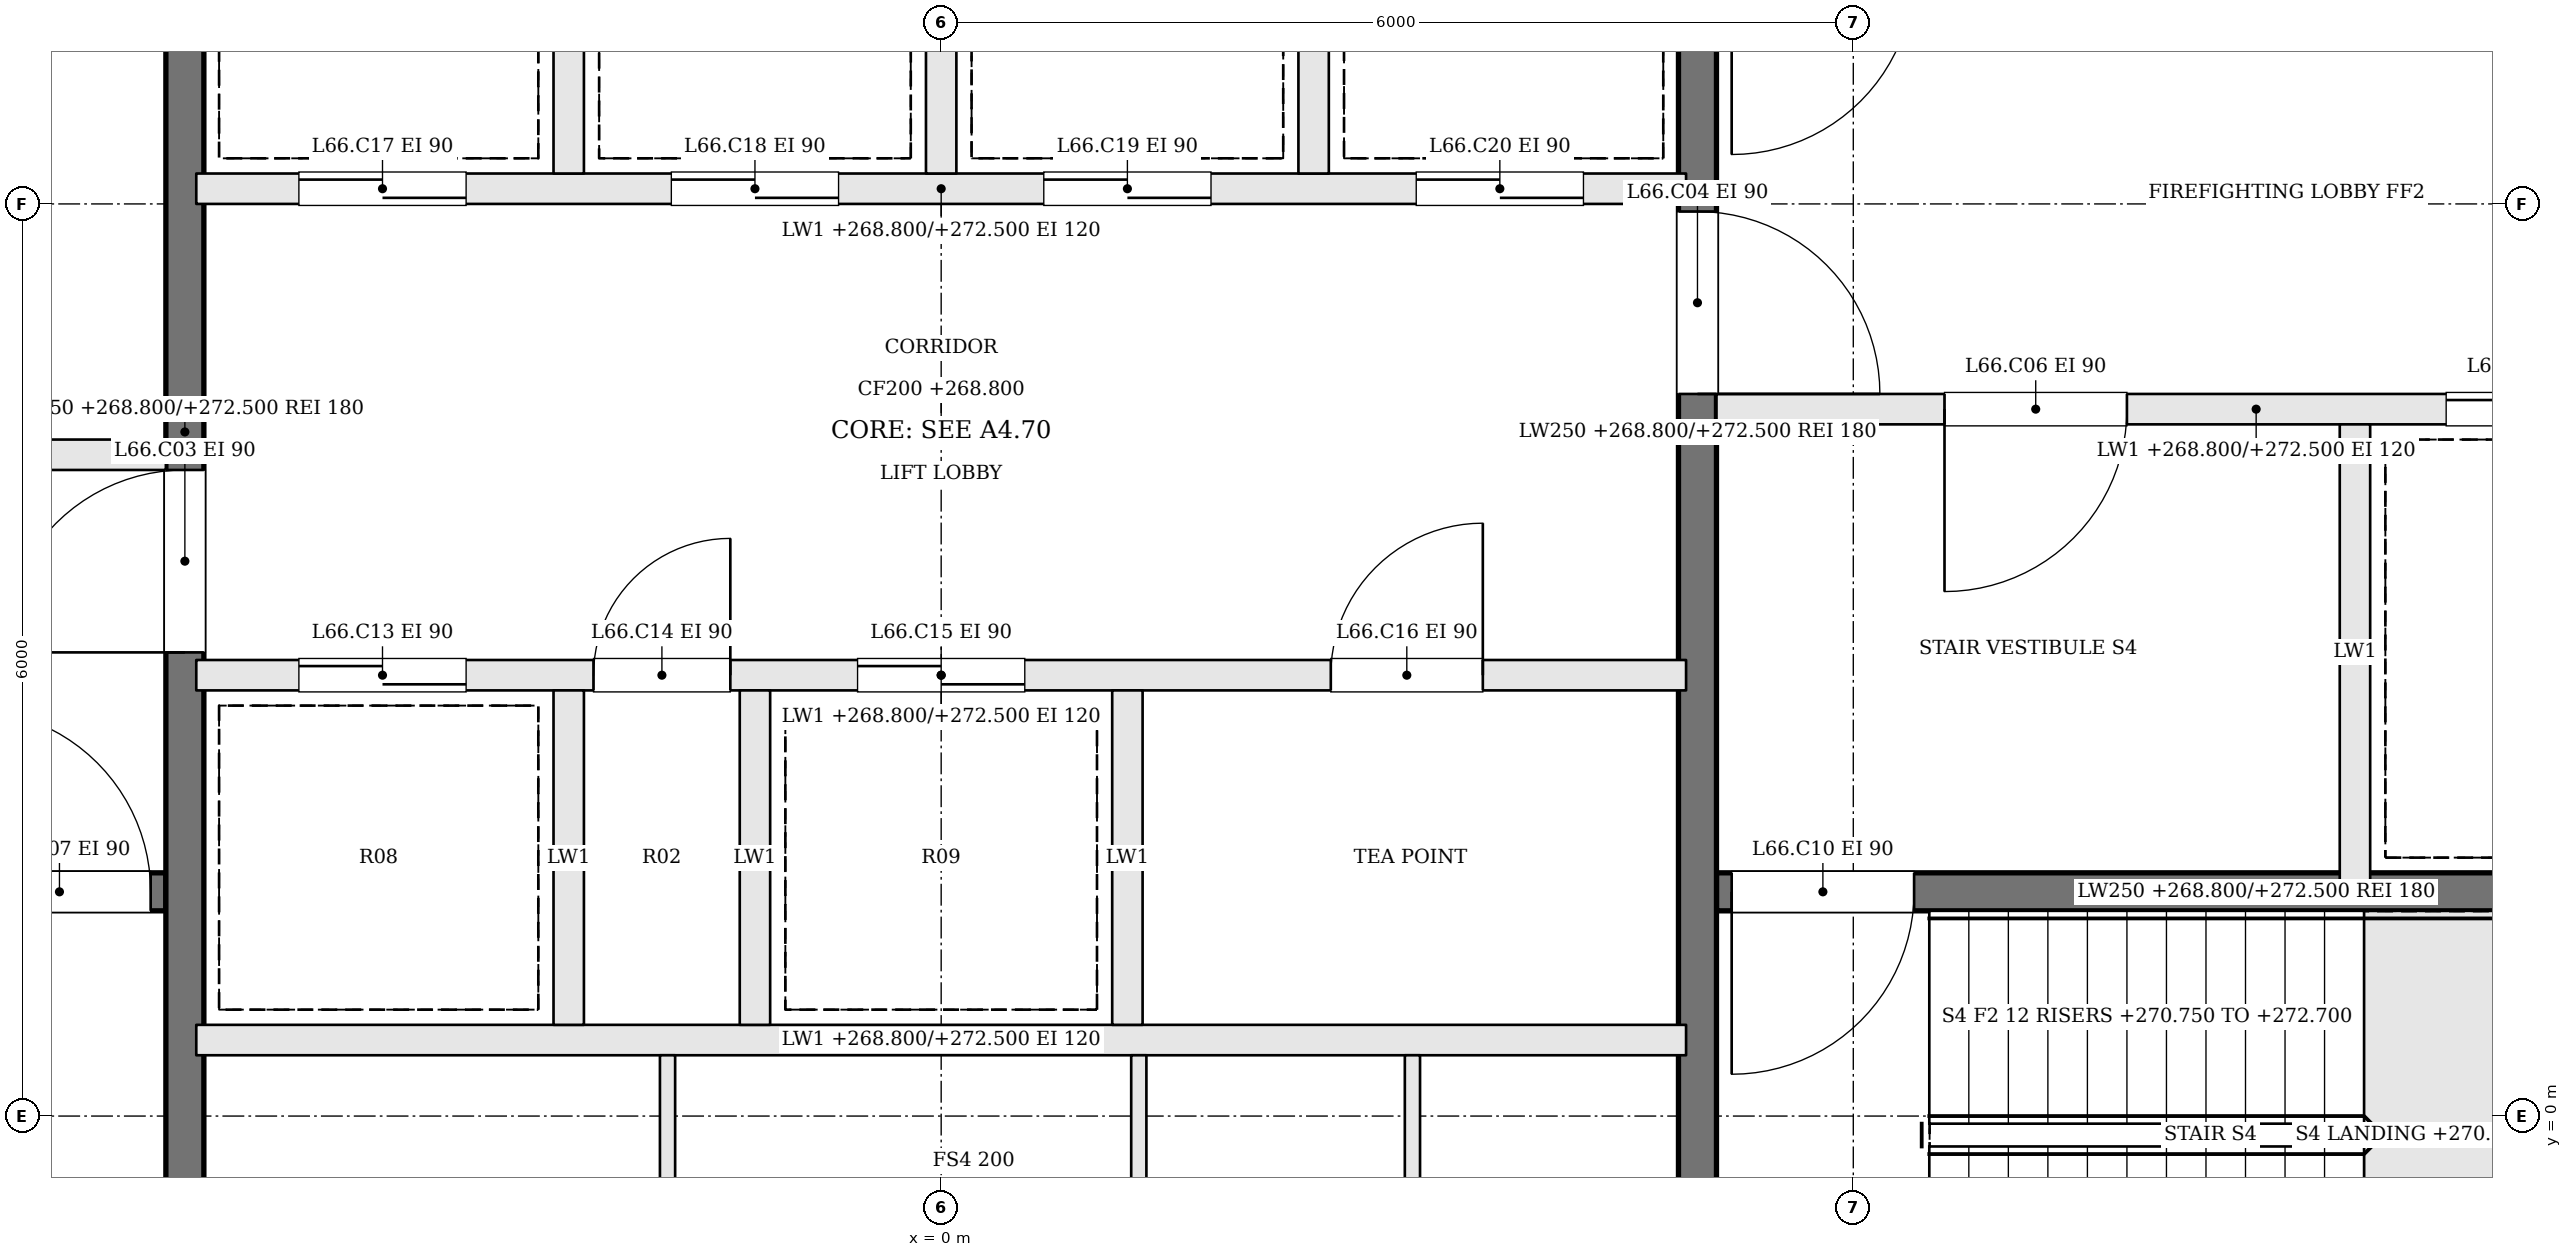
"""IFC4 building model, lengths in metres.
Left out: names, types, materials, properties, quantities, classifications, styles, units other than length and angle.
Written with IfcOpenShell. Run it as: python <this file> out.ifc"""

import sys

from ifc_helpers import new_model, si_unit, direction, frame, frame_2d, origin, place, context, subcontext, project, spatial, rectangle, extrude, element, fill, save


model = new_model("IFC4")
c1 = context("Model", 3, precision=1e-05, world=origin(), true_north=direction((0.0, 1.0)))
c2 = subcontext(c1, "Body", "Model", "MODEL_VIEW")
j1 = project(units=[si_unit("LENGTHUNIT", "METRE"), si_unit("PLANEANGLEUNIT", "RADIAN")], contexts=[c1])
p1 = place(None, origin())
s1 = spatial("IfcSite", under=j1, at=p1, CompositionType="ELEMENT")
p2 = place(p1, origin())
s2 = spatial("IfcBuilding", under=s1, at=p2, CompositionType="ELEMENT")
p3 = place(p2, frame((0.0, 0.0, 268.8)))
s3 = spatial("IfcBuildingStorey", under=s2, at=p3, CompositionType="ELEMENT", Elevation=268.8)
p4 = place(p3, frame((-12.2, 1.475, 0.0), z_axis=(0.0, 0.0, 1.0), x_axis=(1.0, 0.0, 0.0)))
e1 = element("IfcWall", 1, at=p4, inside=s3, PredefinedType="SOLIDWALL", context=c2, shape_type="SweptSolid", body=[
    extrude(rectangle(XDim=7.1, YDim=0.25, at=frame_2d((3.55, 0.0))), origin(), (0.0, 0.0, 1.0), 3.7),
])
p5 = place(p4, frame((5.8, 0.0, 0.0)))
e2 = element("IfcOpeningElement", 2, at=p5, cuts=e1, PredefinedType="OPENING", context=c2, shape_type="SweptSolid", body=[
    extrude(rectangle(XDim=1.2, YDim=2.1, at=frame_2d((0.6, 1.05))), frame((0.0, 0.135, 0.0), z_axis=(0.0, -1.0, 0.0), x_axis=(1.0, 0.0, 0.0)), (0.0, 0.0, 1.0), 0.27),
])
p6 = place(p3, frame((-12.2, 4.35, 0.0), z_axis=(0.0, 0.0, 1.0), x_axis=(1.0, 0.0, 0.0)))
e3 = element("IfcWall", 3, at=p6, inside=s3, PredefinedType="SOLIDWALL", context=c2, shape_type="SweptSolid", body=[
    extrude(rectangle(XDim=7.1, YDim=0.2, at=frame_2d((3.55, 0.0))), origin(), (0.0, 0.0, 1.0), 3.7),
])
p7 = place(p6, frame((4.4, 0.0, 0.0)))
e4 = element("IfcOpeningElement", 4, at=p7, cuts=e3, PredefinedType="OPENING", context=c2, shape_type="SweptSolid", body=[
    extrude(rectangle(XDim=1.2, YDim=2.1, at=frame_2d((0.6, 1.05))), frame((0.0, 0.11, 0.0), z_axis=(0.0, -1.0, 0.0), x_axis=(1.0, 0.0, 0.0)), (0.0, 0.0, 1.0), 0.22),
])
p8 = place(p6, frame((1.1, 0.0, 0.0)))
e5 = element("IfcOpeningElement", 5, at=p8, cuts=e3, PredefinedType="OPENING", context=c2, shape_type="SweptSolid", body=[
    extrude(rectangle(XDim=1.2, YDim=2.1, at=frame_2d((0.6, 1.05))), frame((0.0, 0.11, 0.0), z_axis=(0.0, -1.0, 0.0), x_axis=(1.0, 0.0, 0.0)), (0.0, 0.0, 1.0), 0.22),
])
p9 = place(p3, frame((12.2, 4.65, 0.0), z_axis=(0.0, 0.0, 1.0), x_axis=(-1.0, 0.0, 0.0)))
e6 = element("IfcWall", 6, at=p9, inside=s3, PredefinedType="SOLIDWALL", context=c2, shape_type="SweptSolid", body=[
    extrude(rectangle(XDim=7.1, YDim=0.2, at=frame_2d((3.55, 0.0))), origin(), (0.0, 0.0, 1.0), 3.7),
])
p10 = place(p9, frame((4.4, 0.0, 0.0)))
e7 = element("IfcOpeningElement", 7, at=p10, cuts=e6, PredefinedType="OPENING", context=c2, shape_type="SweptSolid", body=[
    extrude(rectangle(XDim=1.2, YDim=2.1, at=frame_2d((0.6, 1.05))), frame((0.0, 0.11, 0.0), z_axis=(0.0, -1.0, 0.0), x_axis=(1.0, 0.0, 0.0)), (0.0, 0.0, 1.0), 0.22),
])
p11 = place(p9, frame((1.1, 0.0, 0.0)))
e8 = element("IfcOpeningElement", 8, at=p11, cuts=e6, PredefinedType="OPENING", context=c2, shape_type="SweptSolid", body=[
    extrude(rectangle(XDim=1.2, YDim=2.1, at=frame_2d((0.6, 1.05))), frame((0.0, 0.11, 0.0), z_axis=(0.0, -1.0, 0.0), x_axis=(1.0, 0.0, 0.0)), (0.0, 0.0, 1.0), 0.22),
])
p12 = place(p3, frame((12.2, 1.475, 0.0), z_axis=(0.0, 0.0, 1.0), x_axis=(-1.0, 0.0, 0.0)))
e9 = element("IfcWall", 9, at=p12, inside=s3, PredefinedType="SOLIDWALL", context=c2, shape_type="SweptSolid", body=[
    extrude(rectangle(XDim=7.1, YDim=0.25, at=frame_2d((3.55, 0.0))), origin(), (0.0, 0.0, 1.0), 3.7),
])
p13 = place(p12, frame((5.8, 0.0, 0.0)))
e10 = element("IfcOpeningElement", 10, at=p13, cuts=e9, PredefinedType="OPENING", context=c2, shape_type="SweptSolid", body=[
    extrude(rectangle(XDim=1.2, YDim=2.1, at=frame_2d((0.6, 1.05))), frame((0.0, 0.135, 0.0), z_axis=(0.0, -1.0, 0.0), x_axis=(1.0, 0.0, 0.0)), (0.0, 0.0, 1.0), 0.27),
])
p14 = place(p3, frame((9.3, 4.55, 0.0), z_axis=(0.0, 0.0, 1.0), x_axis=(0.0, -1.0, 0.0)))
e11 = element("IfcWall", 11, at=p14, inside=s3, PredefinedType="SOLIDWALL", context=c2, shape_type="SweptSolid", body=[
    extrude(rectangle(XDim=3.0, YDim=0.2, at=frame_2d((1.5, 0.0))), origin(), (0.0, 0.0, 1.0), 3.7),
])
p15 = place(p3, frame((-4.975, -2.2, 0.0), z_axis=(0.0, 0.0, 1.0), x_axis=(0.0, 1.0, 0.0)))
e12 = element("IfcWall", 12, at=p15, inside=s3, PredefinedType="SOLIDWALL", context=c2, shape_type="SweptSolid", body=[
    extrude(rectangle(XDim=13.4, YDim=0.25, at=frame_2d((6.7, 0.0))), origin(), (0.0, 0.0, 1.0), 3.7),
])
p16 = place(p15, frame((5.25, 0.0, 0.0)))
e13 = element("IfcOpeningElement", 13, at=p16, cuts=e12, PredefinedType="OPENING", context=c2, shape_type="SweptSolid", body=[
    extrude(rectangle(XDim=1.2, YDim=2.1, at=frame_2d((0.6, 1.05))), frame((0.0, 0.135, 0.0), z_axis=(0.0, -1.0, 0.0), x_axis=(1.0, 0.0, 0.0)), (0.0, 0.0, 1.0), 0.27),
])
p17 = place(p3, frame((4.975, 11.2, 0.0), z_axis=(0.0, 0.0, 1.0), x_axis=(0.0, -1.0, 0.0)))
e14 = element("IfcWall", 14, at=p17, inside=s3, PredefinedType="SOLIDWALL", context=c2, shape_type="SweptSolid", body=[
    extrude(rectangle(XDim=13.4, YDim=0.25, at=frame_2d((6.7, 0.0))), origin(), (0.0, 0.0, 1.0), 3.7),
])
p18 = place(p17, frame((5.25, 0.0, 0.0)))
e15 = element("IfcOpeningElement", 15, at=p18, cuts=e14, PredefinedType="OPENING", context=c2, shape_type="SweptSolid", body=[
    extrude(rectangle(XDim=1.2, YDim=2.1, at=frame_2d((0.6, 1.05))), frame((0.0, 0.135, 0.0), z_axis=(0.0, -1.0, 0.0), x_axis=(1.0, 0.0, 0.0)), (0.0, 0.0, 1.0), 0.27),
])
p19 = place(p3, frame((-4.9, 0.5, 0.0), z_axis=(0.0, 0.0, 1.0), x_axis=(1.0, 0.0, 0.0)))
e16 = element("IfcWall", 16, at=p19, inside=s3, PredefinedType="SOLIDWALL", context=c2, shape_type="SweptSolid", body=[
    extrude(rectangle(XDim=9.8, YDim=0.2, at=frame_2d((4.9, 0.0))), origin(), (0.0, 0.0, 1.0), 3.7),
])
p20 = place(p3, frame((-4.9, 2.9, 0.0), z_axis=(0.0, 0.0, 1.0), x_axis=(1.0, 0.0, 0.0)))
e17 = element("IfcWall", 17, at=p20, inside=s3, PredefinedType="SOLIDWALL", context=c2, shape_type="SweptSolid", body=[
    extrude(rectangle(XDim=9.8, YDim=0.2, at=frame_2d((4.9, 0.0))), origin(), (0.0, 0.0, 1.0), 3.7),
])
p21 = place(p20, frame((0.675, 0.0, 0.0)))
e18 = element("IfcOpeningElement", 18, at=p21, cuts=e17, PredefinedType="OPENING", context=c2, shape_type="SweptSolid", body=[
    extrude(rectangle(XDim=1.1, YDim=2.1, at=frame_2d((0.55, 1.05))), frame((0.0, 0.11, 0.0), z_axis=(0.0, -1.0, 0.0), x_axis=(1.0, 0.0, 0.0)), (0.0, 0.0, 1.0), 0.22),
])
p22 = place(p20, frame((2.613, 0.0, 0.0)))
e19 = element("IfcOpeningElement", 19, at=p22, cuts=e17, PredefinedType="OPENING", context=c2, shape_type="SweptSolid", body=[
    extrude(rectangle(XDim=0.9, YDim=2.1, at=frame_2d((0.45, 1.05))), frame((0.0, 0.11, 0.0), z_axis=(0.0, -1.0, 0.0), x_axis=(1.0, 0.0, 0.0)), (0.0, 0.0, 1.0), 0.22),
])
p23 = place(p20, frame((4.35, 0.0, 0.0)))
e20 = element("IfcOpeningElement", 20, at=p23, cuts=e17, PredefinedType="OPENING", context=c2, shape_type="SweptSolid", body=[
    extrude(rectangle(XDim=1.1, YDim=2.1, at=frame_2d((0.55, 1.05))), frame((0.0, 0.11, 0.0), z_axis=(0.0, -1.0, 0.0), x_axis=(1.0, 0.0, 0.0)), (0.0, 0.0, 1.0), 0.22),
])
p24 = place(p20, frame((7.463, 0.0, 0.0)))
e21 = element("IfcOpeningElement", 21, at=p24, cuts=e17, PredefinedType="OPENING", context=c2, shape_type="SweptSolid", body=[
    extrude(rectangle(XDim=1.0, YDim=2.1, at=frame_2d((0.5, 1.05))), frame((0.0, 0.11, 0.0), z_axis=(0.0, -1.0, 0.0), x_axis=(1.0, 0.0, 0.0)), (0.0, 0.0, 1.0), 0.22),
])
p25 = place(p3, frame((-4.9, 6.1, 0.0), z_axis=(0.0, 0.0, 1.0), x_axis=(1.0, 0.0, 0.0)))
e22 = element("IfcWall", 22, at=p25, inside=s3, PredefinedType="SOLIDWALL", context=c2, shape_type="SweptSolid", body=[
    extrude(rectangle(XDim=9.8, YDim=0.2, at=frame_2d((4.9, 0.0))), origin(), (0.0, 0.0, 1.0), 3.7),
])
p26 = place(p25, frame((0.675, 0.0, 0.0)))
e23 = element("IfcOpeningElement", 23, at=p26, cuts=e22, PredefinedType="OPENING", context=c2, shape_type="SweptSolid", body=[
    extrude(rectangle(XDim=1.1, YDim=2.1, at=frame_2d((0.55, 1.05))), frame((0.0, 0.11, 0.0), z_axis=(0.0, -1.0, 0.0), x_axis=(1.0, 0.0, 0.0)), (0.0, 0.0, 1.0), 0.22),
])
p27 = place(p25, frame((3.125, 0.0, 0.0)))
e24 = element("IfcOpeningElement", 24, at=p27, cuts=e22, PredefinedType="OPENING", context=c2, shape_type="SweptSolid", body=[
    extrude(rectangle(XDim=1.1, YDim=2.1, at=frame_2d((0.55, 1.05))), frame((0.0, 0.11, 0.0), z_axis=(0.0, -1.0, 0.0), x_axis=(1.0, 0.0, 0.0)), (0.0, 0.0, 1.0), 0.22),
])
p28 = place(p25, frame((5.575, 0.0, 0.0)))
e25 = element("IfcOpeningElement", 25, at=p28, cuts=e22, PredefinedType="OPENING", context=c2, shape_type="SweptSolid", body=[
    extrude(rectangle(XDim=1.1, YDim=2.1, at=frame_2d((0.55, 1.05))), frame((0.0, 0.11, 0.0), z_axis=(0.0, -1.0, 0.0), x_axis=(1.0, 0.0, 0.0)), (0.0, 0.0, 1.0), 0.22),
])
p29 = place(p25, frame((8.025, 0.0, 0.0)))
e26 = element("IfcOpeningElement", 26, at=p29, cuts=e22, PredefinedType="OPENING", context=c2, shape_type="SweptSolid", body=[
    extrude(rectangle(XDim=1.1, YDim=2.1, at=frame_2d((0.55, 1.05))), frame((0.0, 0.11, 0.0), z_axis=(0.0, -1.0, 0.0), x_axis=(1.0, 0.0, 0.0)), (0.0, 0.0, 1.0), 0.22),
])
for number, where, z_axis, x_axis in (
    (27, (-2.45, 0.6, 0.0), (0.0, 0.0, 1.0), (0.0, 1.0, 0.0)),
    (28, (-1.225, 0.6, 0.0), (0.0, 0.0, 1.0), (0.0, 1.0, 0.0)),
    (29, (1.225, 0.6, 0.0), (0.0, 0.0, 1.0), (0.0, 1.0, 0.0)),
    (30, (-2.45, 6.2, 0.0), (0.0, 0.0, 1.0), (0.0, 1.0, 0.0)),
    (31, (0.0, 6.2, 0.0), (0.0, 0.0, 1.0), (0.0, 1.0, 0.0)),
    (32, (2.45, 6.2, 0.0), (0.0, 0.0, 1.0), (0.0, 1.0, 0.0)),
):
    element("IfcWall", number, at=place(p3, frame(where, z_axis=z_axis, x_axis=x_axis)), inside=s3, PredefinedType="SOLIDWALL", context=c2, shape_type="SweptSolid", body=[
        extrude(rectangle(XDim=2.2, YDim=0.2, at=frame_2d((1.1, 0.0))), origin(), (0.0, 0.0, 1.0), 3.7),
    ])
for number, where, z_axis, x_axis in (
    (33, (-1.8, -2.2, 0.0), (0.0, 0.0, 1.0), (0.0, 1.0, 0.0)),
    (34, (1.3, -2.2, 0.0), (0.0, 0.0, 1.0), (0.0, 1.0, 0.0)),
    (35, (3.1, -2.2, 0.0), (0.0, 0.0, 1.0), (0.0, 1.0, 0.0)),
):
    element("IfcWall", number, at=place(p3, frame(where, z_axis=z_axis, x_axis=x_axis)), inside=s3, PredefinedType="PARTITIONING", context=c2, shape_type="SweptSolid", body=[
        extrude(rectangle(XDim=2.6, YDim=0.1, at=frame_2d((1.3, 0.0))), origin(), (0.0, 0.0, 1.0), 3.7),
    ])
p30 = place(p16, origin())
e36 = element("IfcDoor", 36, at=p30, inside=s3, OperationType="SINGLE_SWING_LEFT", PredefinedType="DOOR", context=c2, shape_type="SweptSolid", body=[
    extrude(rectangle(XDim=1.2, YDim=2.1, at=frame_2d((0.6, 1.05))), frame((0.0, 0.025, 0.0), z_axis=(0.0, -1.0, 0.0), x_axis=(1.0, 0.0, 0.0)), (0.0, 0.0, 1.0), 0.05),
])
fill(e13, e36)
p31 = place(p18, origin())
e37 = element("IfcDoor", 37, at=p31, inside=s3, OperationType="SINGLE_SWING_RIGHT", PredefinedType="DOOR", context=c2, shape_type="SweptSolid", body=[
    extrude(rectangle(XDim=1.2, YDim=2.1, at=frame_2d((0.6, 1.05))), frame((0.0, 0.025, 0.0), z_axis=(0.0, -1.0, 0.0), x_axis=(1.0, 0.0, 0.0)), (0.0, 0.0, 1.0), 0.05),
])
fill(e15, e37)
p32 = place(p10, origin())
e38 = element("IfcDoor", 38, at=p32, inside=s3, OperationType="SINGLE_SWING_RIGHT", PredefinedType="DOOR", context=c2, shape_type="SweptSolid", body=[
    extrude(rectangle(XDim=1.2, YDim=2.1, at=frame_2d((0.6, 1.05))), frame((0.0, 0.025, 0.0), z_axis=(0.0, -1.0, 0.0), x_axis=(1.0, 0.0, 0.0)), (0.0, 0.0, 1.0), 0.05),
])
fill(e7, e38)
p33 = place(p5, origin())
e39 = element("IfcDoor", 39, at=p33, inside=s3, OperationType="SINGLE_SWING_LEFT", PredefinedType="DOOR", context=c2, shape_type="SweptSolid", body=[
    extrude(rectangle(XDim=1.2, YDim=2.1, at=frame_2d((0.6, 1.05))), frame((0.0, 0.025, 0.0), z_axis=(0.0, -1.0, 0.0), x_axis=(1.0, 0.0, 0.0)), (0.0, 0.0, 1.0), 0.05),
])
fill(e2, e39)
p34 = place(p13, origin())
e40 = element("IfcDoor", 40, at=p34, inside=s3, OperationType="SINGLE_SWING_RIGHT", PredefinedType="DOOR", context=c2, shape_type="SweptSolid", body=[
    extrude(rectangle(XDim=1.2, YDim=2.1, at=frame_2d((0.6, 1.05))), frame((0.0, 0.025, 0.0), z_axis=(0.0, -1.0, 0.0), x_axis=(1.0, 0.0, 0.0)), (0.0, 0.0, 1.0), 0.05),
])
fill(e10, e40)
p35 = place(p11, origin())
e41 = element("IfcDoor", 41, at=p35, inside=s3, OperationType="SLIDING_TO_RIGHT", PredefinedType="DOOR", context=c2, shape_type="SweptSolid", body=[
    extrude(rectangle(XDim=1.2, YDim=2.1, at=frame_2d((0.6, 1.05))), frame((0.0, 0.025, 0.0), z_axis=(0.0, -1.0, 0.0), x_axis=(1.0, 0.0, 0.0)), (0.0, 0.0, 1.0), 0.05),
])
fill(e8, e41)
p36 = place(p21, origin())
e42 = element("IfcDoor", 42, at=p36, inside=s3, OperationType="SLIDING_TO_RIGHT", PredefinedType="DOOR", context=c2, shape_type="SweptSolid", body=[
    extrude(rectangle(XDim=1.1, YDim=2.1, at=frame_2d((0.55, 1.05))), frame((0.0, 0.025, 0.0), z_axis=(0.0, -1.0, 0.0), x_axis=(1.0, 0.0, 0.0)), (0.0, 0.0, 1.0), 0.05),
])
fill(e18, e42)
p37 = place(p22, origin())
e43 = element("IfcDoor", 43, at=p37, inside=s3, OperationType="SINGLE_SWING_RIGHT", PredefinedType="DOOR", context=c2, shape_type="SweptSolid", body=[
    extrude(rectangle(XDim=0.9, YDim=2.1, at=frame_2d((0.45, 1.05))), frame((0.0, 0.025, 0.0), z_axis=(0.0, -1.0, 0.0), x_axis=(1.0, 0.0, 0.0)), (0.0, 0.0, 1.0), 0.05),
])
fill(e19, e43)
p38 = place(p23, origin())
e44 = element("IfcDoor", 44, at=p38, inside=s3, OperationType="SLIDING_TO_LEFT", PredefinedType="DOOR", context=c2, shape_type="SweptSolid", body=[
    extrude(rectangle(XDim=1.1, YDim=2.1, at=frame_2d((0.55, 1.05))), frame((0.0, 0.025, 0.0), z_axis=(0.0, -1.0, 0.0), x_axis=(1.0, 0.0, 0.0)), (0.0, 0.0, 1.0), 0.05),
])
fill(e20, e44)
p39 = place(p24, origin())
e45 = element("IfcDoor", 45, at=p39, inside=s3, OperationType="SINGLE_SWING_RIGHT", PredefinedType="DOOR", context=c2, shape_type="SweptSolid", body=[
    extrude(rectangle(XDim=1.0, YDim=2.1, at=frame_2d((0.5, 1.05))), frame((0.0, 0.025, 0.0), z_axis=(0.0, -1.0, 0.0), x_axis=(1.0, 0.0, 0.0)), (0.0, 0.0, 1.0), 0.05),
])
fill(e21, e45)
p40 = place(p26, origin())
e46 = element("IfcDoor", 46, at=p40, inside=s3, OperationType="SLIDING_TO_RIGHT", PredefinedType="DOOR", context=c2, shape_type="SweptSolid", body=[
    extrude(rectangle(XDim=1.1, YDim=2.1, at=frame_2d((0.55, 1.05))), frame((0.0, 0.025, 0.0), z_axis=(0.0, -1.0, 0.0), x_axis=(1.0, 0.0, 0.0)), (0.0, 0.0, 1.0), 0.05),
])
fill(e23, e46)
p41 = place(p27, origin())
e47 = element("IfcDoor", 47, at=p41, inside=s3, OperationType="SLIDING_TO_LEFT", PredefinedType="DOOR", context=c2, shape_type="SweptSolid", body=[
    extrude(rectangle(XDim=1.1, YDim=2.1, at=frame_2d((0.55, 1.05))), frame((0.0, 0.025, 0.0), z_axis=(0.0, -1.0, 0.0), x_axis=(1.0, 0.0, 0.0)), (0.0, 0.0, 1.0), 0.05),
])
fill(e24, e47)
p42 = place(p28, origin())
e48 = element("IfcDoor", 48, at=p42, inside=s3, OperationType="SLIDING_TO_RIGHT", PredefinedType="DOOR", context=c2, shape_type="SweptSolid", body=[
    extrude(rectangle(XDim=1.1, YDim=2.1, at=frame_2d((0.55, 1.05))), frame((0.0, 0.025, 0.0), z_axis=(0.0, -1.0, 0.0), x_axis=(1.0, 0.0, 0.0)), (0.0, 0.0, 1.0), 0.05),
])
fill(e25, e48)
p43 = place(p29, origin())
e49 = element("IfcDoor", 49, at=p43, inside=s3, OperationType="SLIDING_TO_LEFT", PredefinedType="DOOR", context=c2, shape_type="SweptSolid", body=[
    extrude(rectangle(XDim=1.1, YDim=2.1, at=frame_2d((0.55, 1.05))), frame((0.0, 0.025, 0.0), z_axis=(0.0, -1.0, 0.0), x_axis=(1.0, 0.0, 0.0)), (0.0, 0.0, 1.0), 0.05),
])
fill(e26, e49)
save(model, sys.argv[1])
